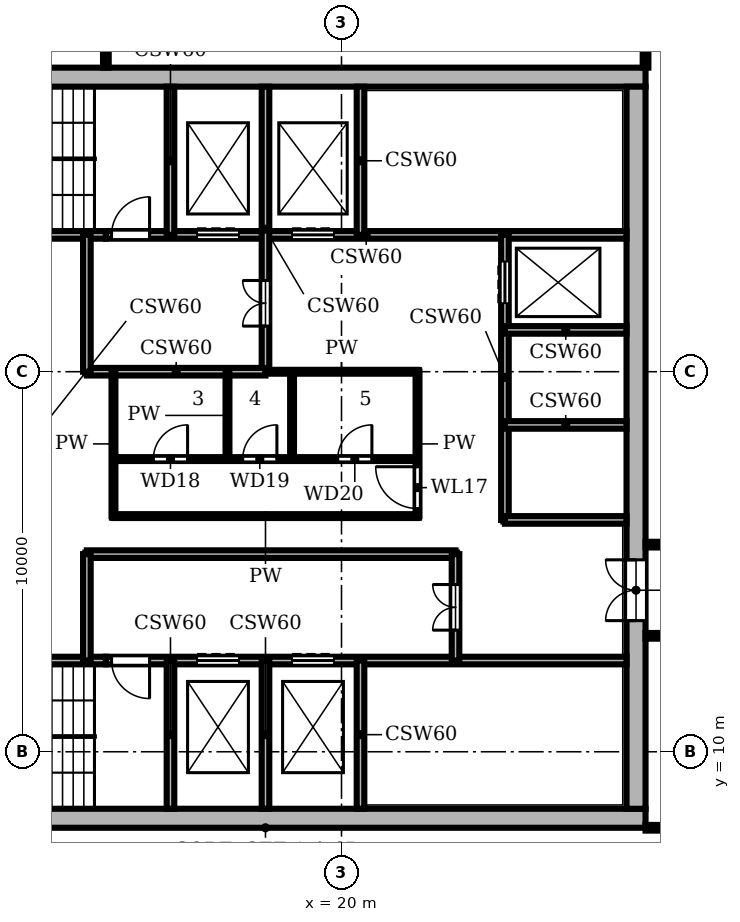
"""IFC4 building model, lengths in metres.
Left out: names, types, materials, properties, quantities, classifications, styles, units other than length and angle.
Written with IfcOpenShell. Run it as: python <this file> out.ifc"""

import sys

from ifc_helpers import new_model, si_unit, direction, frame, frame_2d, origin, place, context, subcontext, project, spatial, rectangle, extrude, element, fill, save


model = new_model("IFC4")
c1 = context("Model", 3, precision=1e-05, world=origin(), true_north=direction((0.0, 1.0)))
c2 = subcontext(c1, "Body", "Model", "MODEL_VIEW")
j1 = project(units=[si_unit("LENGTHUNIT", "METRE"), si_unit("PLANEANGLEUNIT", "RADIAN")], contexts=[c1])
p1 = place(None, origin())
s1 = spatial("IfcSite", under=j1, at=p1, CompositionType="ELEMENT")
p2 = place(p1, origin())
s2 = spatial("IfcBuilding", under=s1, at=p2, CompositionType="ELEMENT")
p3 = place(p2, frame((0.0, 0.0, 282.6)))
s3 = spatial("IfcBuildingStorey", under=s2, at=p3, CompositionType="ELEMENT", Elevation=282.6)
p4 = place(p3, frame((8.0, 8.25, 0.0), z_axis=(0.0, 0.0, 1.0), x_axis=(1.0, 0.0, 0.0)))
e1 = element("IfcWall", 1, at=p4, inside=s3, PredefinedType="SHEAR", context=c2, shape_type="SweptSolid", body=[
    extrude(rectangle(XDim=20.0, YDim=0.5, at=frame_2d((10.0, 0.0))), origin(), (0.0, 0.0, 1.0), 3.9),
])
p5 = place(p3, frame((27.75, 8.5, 0.0), z_axis=(0.0, 0.0, 1.0), x_axis=(0.0, 1.0, 0.0)))
e2 = element("IfcWall", 2, at=p5, inside=s3, PredefinedType="SHEAR", context=c2, shape_type="SweptSolid", body=[
    extrude(rectangle(XDim=19.0, YDim=0.5, at=frame_2d((9.5, 0.0))), origin(), (0.0, 0.0, 1.0), 3.9),
])
p6 = place(p5, frame((4.95, 0.0, 0.0)))
e3 = element("IfcOpeningElement", 3, at=p6, cuts=e2, PredefinedType="OPENING", context=c2, shape_type="SweptSolid", body=[
    extrude(rectangle(XDim=1.6, YDim=2.1, at=frame_2d((0.8, 1.05))), frame((0.0, 0.26, 0.0), z_axis=(0.0, -1.0, 0.0), x_axis=(1.0, 0.0, 0.0)), (0.0, 0.0, 1.0), 0.52),
])
p7 = place(p3, frame((28.0, 27.75, 0.0), z_axis=(0.0, 0.0, 1.0), x_axis=(-1.0, 0.0, 0.0)))
e4 = element("IfcWall", 4, at=p7, inside=s3, PredefinedType="SHEAR", context=c2, shape_type="SweptSolid", body=[
    extrude(rectangle(XDim=20.0, YDim=0.5, at=frame_2d((10.0, 0.0))), origin(), (0.0, 0.0, 1.0), 3.9),
])
p8 = place(p3, frame((8.5, 12.4, 0.0), z_axis=(0.0, 0.0, 1.0), x_axis=(1.0, 0.0, 0.0)))
e5 = element("IfcWall", 5, at=p8, inside=s3, PredefinedType="SHEAR", context=c2, shape_type="SweptSolid", body=[
    extrude(rectangle(XDim=5.3, YDim=0.2, at=frame_2d((2.65, 0.0))), origin(), (0.0, 0.0, 1.0), 3.58),
])
p9 = place(p3, frame((13.8, 12.4, 0.0), z_axis=(0.0, 0.0, 1.0), x_axis=(1.0, 0.0, 0.0)))
e6 = element("IfcWall", 6, at=p9, inside=s3, PredefinedType="SHEAR", context=c2, shape_type="SweptSolid", body=[
    extrude(rectangle(XDim=13.7, YDim=0.2, at=frame_2d((6.85, 0.0))), origin(), (0.0, 0.0, 1.0), 3.58),
])
p10 = place(p9, frame((2.4, 0.0, 0.0)))
e7 = element("IfcOpeningElement", 7, at=p10, cuts=e6, PredefinedType="OPENING", context=c2, shape_type="SweptSolid", body=[
    extrude(rectangle(XDim=1.1, YDim=2.1, at=frame_2d((0.55, 1.05))), frame((0.0, 0.11, 0.0), z_axis=(0.0, -1.0, 0.0), x_axis=(1.0, 0.0, 0.0)), (0.0, 0.0, 1.0), 0.22),
])
p11 = place(p9, frame((4.9, 0.0, 0.0)))
e8 = element("IfcOpeningElement", 8, at=p11, cuts=e6, PredefinedType="OPENING", context=c2, shape_type="SweptSolid", body=[
    extrude(rectangle(XDim=1.1, YDim=2.1, at=frame_2d((0.55, 1.05))), frame((0.0, 0.11, 0.0), z_axis=(0.0, -1.0, 0.0), x_axis=(1.0, 0.0, 0.0)), (0.0, 0.0, 1.0), 0.22),
])
p12 = place(p9, frame((0.15, 0.0, 0.0)))
e9 = element("IfcOpeningElement", 9, at=p12, cuts=e6, PredefinedType="OPENING", context=c2, shape_type="SweptSolid", body=[
    extrude(rectangle(XDim=1.0, YDim=2.1, at=frame_2d((0.5, 1.05))), frame((0.0, 0.11, 0.0), z_axis=(0.0, -1.0, 0.0), x_axis=(1.0, 0.0, 0.0)), (0.0, 0.0, 1.0), 0.22),
])
p13 = place(p3, frame((13.3, 15.2, 0.0), z_axis=(0.0, 0.0, 1.0), x_axis=(1.0, 0.0, 0.0)))
e10 = element("IfcWall", 10, at=p13, inside=s3, PredefinedType="SHEAR", context=c2, shape_type="SweptSolid", body=[
    extrude(rectangle(XDim=9.7, YDim=0.2, at=frame_2d((4.85, 0.0))), origin(), (0.0, 0.0, 1.0), 3.58),
])
p14 = place(p3, frame((24.3, 16.1, 0.0), z_axis=(0.0, 0.0, 1.0), x_axis=(1.0, 0.0, 0.0)))
e11 = element("IfcWall", 11, at=p14, inside=s3, PredefinedType="SHEAR", context=c2, shape_type="SweptSolid", body=[
    extrude(rectangle(XDim=3.2, YDim=0.2, at=frame_2d((1.6, 0.0))), origin(), (0.0, 0.0, 1.0), 3.58),
])
p15 = place(p3, frame((14.0, 16.2, 0.0), z_axis=(0.0, 0.0, 1.0), x_axis=(1.0, 0.0, 0.0)))
e12 = element("IfcWall", 12, at=p15, inside=s3, PredefinedType="PARTITIONING", context=c2, shape_type="SweptSolid", body=[
    extrude(rectangle(XDim=8.0, YDim=0.1, at=frame_2d((4.0, 0.0))), origin(), (0.0, 0.0, 1.0), 3.58),
])
p16 = place(p3, frame((14.0, 17.7, 0.0), z_axis=(0.0, 0.0, 1.0), x_axis=(1.0, 0.0, 0.0)))
e13 = element("IfcWall", 13, at=p16, inside=s3, PredefinedType="PARTITIONING", context=c2, shape_type="SweptSolid", body=[
    extrude(rectangle(XDim=8.0, YDim=0.1, at=frame_2d((4.0, 0.0))), origin(), (0.0, 0.0, 1.0), 3.58),
])
p17 = place(p16, frame((1.05, 0.0, 0.0)))
e14 = element("IfcOpeningElement", 14, at=p17, cuts=e13, PredefinedType="OPENING", context=c2, shape_type="SweptSolid", body=[
    extrude(rectangle(XDim=0.9, YDim=2.1, at=frame_2d((0.45, 1.05))), frame((0.0, 0.06, 0.0), z_axis=(0.0, -1.0, 0.0), x_axis=(1.0, 0.0, 0.0)), (0.0, 0.0, 1.0), 0.12),
])
p18 = place(p16, frame((3.4, 0.0, 0.0)))
e15 = element("IfcOpeningElement", 15, at=p18, cuts=e13, PredefinedType="OPENING", context=c2, shape_type="SweptSolid", body=[
    extrude(rectangle(XDim=0.9, YDim=2.1, at=frame_2d((0.45, 1.05))), frame((0.0, 0.06, 0.0), z_axis=(0.0, -1.0, 0.0), x_axis=(1.0, 0.0, 0.0)), (0.0, 0.0, 1.0), 0.12),
])
p19 = place(p16, frame((5.9, 0.0, 0.0)))
e16 = element("IfcOpeningElement", 16, at=p19, cuts=e13, PredefinedType="OPENING", context=c2, shape_type="SweptSolid", body=[
    extrude(rectangle(XDim=0.9, YDim=2.1, at=frame_2d((0.45, 1.05))), frame((0.0, 0.06, 0.0), z_axis=(0.0, -1.0, 0.0), x_axis=(1.0, 0.0, 0.0)), (0.0, 0.0, 1.0), 0.12),
])
p20 = place(p3, frame((24.3, 18.6, 0.0), z_axis=(0.0, 0.0, 1.0), x_axis=(1.0, 0.0, 0.0)))
e17 = element("IfcWall", 17, at=p20, inside=s3, PredefinedType="SHEAR", context=c2, shape_type="SweptSolid", body=[
    extrude(rectangle(XDim=3.2, YDim=0.2, at=frame_2d((1.6, 0.0))), origin(), (0.0, 0.0, 1.0), 3.58),
])
p21 = place(p3, frame((18.0, 20.0, 0.0), z_axis=(0.0, 0.0, 1.0), x_axis=(1.0, 0.0, 0.0)))
e18 = element("IfcWall", 18, at=p21, inside=s3, PredefinedType="PARTITIONING", context=c2, shape_type="SweptSolid", body=[
    extrude(rectangle(XDim=4.0, YDim=0.1, at=frame_2d((2.0, 0.0))), origin(), (0.0, 0.0, 1.0), 3.58),
])
p22 = place(p3, frame((13.3, 20.0, 0.0), z_axis=(0.0, 0.0, 1.0), x_axis=(1.0, 0.0, 0.0)))
e19 = element("IfcWall", 19, at=p22, inside=s3, PredefinedType="SHEAR", context=c2, shape_type="SweptSolid", body=[
    extrude(rectangle(XDim=4.7, YDim=0.2, at=frame_2d((2.35, 0.0))), origin(), (0.0, 0.0, 1.0), 3.58),
])
p23 = place(p3, frame((24.3, 21.1, 0.0), z_axis=(0.0, 0.0, 1.0), x_axis=(1.0, 0.0, 0.0)))
e20 = element("IfcWall", 20, at=p23, inside=s3, PredefinedType="SHEAR", context=c2, shape_type="SweptSolid", body=[
    extrude(rectangle(XDim=3.2, YDim=0.2, at=frame_2d((1.6, 0.0))), origin(), (0.0, 0.0, 1.0), 3.58),
])
p24 = place(p3, frame((8.5, 23.6, 0.0), z_axis=(0.0, 0.0, 1.0), x_axis=(1.0, 0.0, 0.0)))
e21 = element("IfcWall", 21, at=p24, inside=s3, PredefinedType="SHEAR", context=c2, shape_type="SweptSolid", body=[
    extrude(rectangle(XDim=5.3, YDim=0.2, at=frame_2d((2.65, 0.0))), origin(), (0.0, 0.0, 1.0), 3.58),
])
p25 = place(p3, frame((13.8, 23.6, 0.0), z_axis=(0.0, 0.0, 1.0), x_axis=(1.0, 0.0, 0.0)))
e22 = element("IfcWall", 22, at=p25, inside=s3, PredefinedType="SHEAR", context=c2, shape_type="SweptSolid", body=[
    extrude(rectangle(XDim=13.7, YDim=0.2, at=frame_2d((6.85, 0.0))), origin(), (0.0, 0.0, 1.0), 3.58),
])
p26 = place(p25, frame((2.4, 0.0, 0.0)))
e23 = element("IfcOpeningElement", 23, at=p26, cuts=e22, PredefinedType="OPENING", context=c2, shape_type="SweptSolid", body=[
    extrude(rectangle(XDim=1.1, YDim=2.1, at=frame_2d((0.55, 1.05))), frame((0.0, 0.11, 0.0), z_axis=(0.0, -1.0, 0.0), x_axis=(1.0, 0.0, 0.0)), (0.0, 0.0, 1.0), 0.22),
])
p27 = place(p25, frame((4.9, 0.0, 0.0)))
e24 = element("IfcOpeningElement", 24, at=p27, cuts=e22, PredefinedType="OPENING", context=c2, shape_type="SweptSolid", body=[
    extrude(rectangle(XDim=1.1, YDim=2.1, at=frame_2d((0.55, 1.05))), frame((0.0, 0.11, 0.0), z_axis=(0.0, -1.0, 0.0), x_axis=(1.0, 0.0, 0.0)), (0.0, 0.0, 1.0), 0.22),
])
p28 = place(p25, frame((0.15, 0.0, 0.0)))
e25 = element("IfcOpeningElement", 25, at=p28, cuts=e22, PredefinedType="OPENING", context=c2, shape_type="SweptSolid", body=[
    extrude(rectangle(XDim=1.0, YDim=2.1, at=frame_2d((0.5, 1.05))), frame((0.0, 0.11, 0.0), z_axis=(0.0, -1.0, 0.0), x_axis=(1.0, 0.0, 0.0)), (0.0, 0.0, 1.0), 0.22),
])
p29 = place(p3, frame((13.3, 12.4, 0.0), z_axis=(0.0, 0.0, 1.0), x_axis=(0.0, 1.0, 0.0)))
e26 = element("IfcWall", 26, at=p29, inside=s3, PredefinedType="SHEAR", context=c2, shape_type="SweptSolid", body=[
    extrude(rectangle(XDim=2.8, YDim=0.2, at=frame_2d((1.4, 0.0))), origin(), (0.0, 0.0, 1.0), 3.58),
])
p30 = place(p3, frame((13.3, 20.0, 0.0), z_axis=(0.0, 0.0, 1.0), x_axis=(0.0, 1.0, 0.0)))
e27 = element("IfcWall", 27, at=p30, inside=s3, PredefinedType="SHEAR", context=c2, shape_type="SweptSolid", body=[
    extrude(rectangle(XDim=3.6, YDim=0.2, at=frame_2d((1.8, 0.0))), origin(), (0.0, 0.0, 1.0), 3.58),
])
p31 = place(p3, frame((14.0, 16.2, 0.0), z_axis=(0.0, 0.0, 1.0), x_axis=(0.0, 1.0, 0.0)))
e28 = element("IfcWall", 28, at=p31, inside=s3, PredefinedType="PARTITIONING", context=c2, shape_type="SweptSolid", body=[
    extrude(rectangle(XDim=3.8, YDim=0.1, at=frame_2d((1.9, 0.0))), origin(), (0.0, 0.0, 1.0), 3.58),
])
for number, where, z_axis, x_axis in (
    (29, (15.5, 8.5, 0.0), (0.0, 0.0, 1.0), (0.0, 1.0, 0.0)),
    (30, (15.5, 23.6, 0.0), (0.0, 0.0, 1.0), (0.0, 1.0, 0.0)),
):
    element("IfcWall", number, at=place(p3, frame(where, z_axis=z_axis, x_axis=x_axis)), inside=s3, PredefinedType="SHEAR", context=c2, shape_type="SweptSolid", body=[
        extrude(rectangle(XDim=3.9, YDim=0.2, at=frame_2d((1.95, 0.0))), origin(), (0.0, 0.0, 1.0), 3.58),
    ])
p32 = place(p3, frame((17.0, 17.7, 0.0), z_axis=(0.0, 0.0, 1.0), x_axis=(0.0, 1.0, 0.0)))
e31 = element("IfcWall", 31, at=p32, inside=s3, PredefinedType="PARTITIONING", context=c2, shape_type="SweptSolid", body=[
    extrude(rectangle(XDim=2.3, YDim=0.1, at=frame_2d((1.15, 0.0))), origin(), (0.0, 0.0, 1.0), 3.58),
])
p33 = place(p3, frame((18.0, 8.5, 0.0), z_axis=(0.0, 0.0, 1.0), x_axis=(0.0, 1.0, 0.0)))
e32 = element("IfcWall", 32, at=p33, inside=s3, PredefinedType="SHEAR", context=c2, shape_type="SweptSolid", body=[
    extrude(rectangle(XDim=3.9, YDim=0.2, at=frame_2d((1.95, 0.0))), origin(), (0.0, 0.0, 1.0), 3.58),
])
p34 = place(p3, frame((18.0, 20.0, 0.0), z_axis=(0.0, 0.0, 1.0), x_axis=(0.0, 1.0, 0.0)))
e33 = element("IfcWall", 33, at=p34, inside=s3, PredefinedType="SHEAR", context=c2, shape_type="SweptSolid", body=[
    extrude(rectangle(XDim=7.5, YDim=0.2, at=frame_2d((3.75, 0.0))), origin(), (0.0, 0.0, 1.0), 3.58),
])
p35 = place(p34, frame((1.2, 0.0, 0.0)))
e34 = element("IfcOpeningElement", 34, at=p35, cuts=e33, PredefinedType="OPENING", context=c2, shape_type="SweptSolid", body=[
    extrude(rectangle(XDim=1.2, YDim=2.1, at=frame_2d((0.6, 1.05))), frame((0.0, 0.11, 0.0), z_axis=(0.0, -1.0, 0.0), x_axis=(1.0, 0.0, 0.0)), (0.0, 0.0, 1.0), 0.22),
])
p36 = place(p3, frame((18.7, 17.7, 0.0), z_axis=(0.0, 0.0, 1.0), x_axis=(0.0, 1.0, 0.0)))
e35 = element("IfcWall", 35, at=p36, inside=s3, PredefinedType="PARTITIONING", context=c2, shape_type="SweptSolid", body=[
    extrude(rectangle(XDim=2.3, YDim=0.1, at=frame_2d((1.15, 0.0))), origin(), (0.0, 0.0, 1.0), 3.58),
])
for number, where, z_axis, x_axis in (
    (36, (20.5, 8.5, 0.0), (0.0, 0.0, 1.0), (0.0, 1.0, 0.0)),
    (37, (20.5, 23.6, 0.0), (0.0, 0.0, 1.0), (0.0, 1.0, 0.0)),
):
    element("IfcWall", number, at=place(p3, frame(where, z_axis=z_axis, x_axis=x_axis)), inside=s3, PredefinedType="SHEAR", context=c2, shape_type="SweptSolid", body=[
        extrude(rectangle(XDim=3.9, YDim=0.2, at=frame_2d((1.95, 0.0))), origin(), (0.0, 0.0, 1.0), 3.58),
    ])
p37 = place(p3, frame((22.0, 16.2, 0.0), z_axis=(0.0, 0.0, 1.0), x_axis=(0.0, 1.0, 0.0)))
e38 = element("IfcWall", 38, at=p37, inside=s3, PredefinedType="PARTITIONING", context=c2, shape_type="SweptSolid", body=[
    extrude(rectangle(XDim=3.8, YDim=0.1, at=frame_2d((1.9, 0.0))), origin(), (0.0, 0.0, 1.0), 3.58),
])
p38 = place(p37, frame((0.2, 0.0, 0.0)))
e39 = element("IfcOpeningElement", 39, at=p38, cuts=e38, PredefinedType="OPENING", context=c2, shape_type="SweptSolid", body=[
    extrude(rectangle(XDim=1.1, YDim=2.1, at=frame_2d((0.55, 1.05))), frame((0.0, 0.06, 0.0), z_axis=(0.0, -1.0, 0.0), x_axis=(1.0, 0.0, 0.0)), (0.0, 0.0, 1.0), 0.12),
])
p39 = place(p3, frame((23.0, 12.4, 0.0), z_axis=(0.0, 0.0, 1.0), x_axis=(0.0, 1.0, 0.0)))
e40 = element("IfcWall", 40, at=p39, inside=s3, PredefinedType="SHEAR", context=c2, shape_type="SweptSolid", body=[
    extrude(rectangle(XDim=2.8, YDim=0.2, at=frame_2d((1.4, 0.0))), origin(), (0.0, 0.0, 1.0), 3.58),
])
p40 = place(p39, frame((0.8, 0.0, 0.0)))
e41 = element("IfcOpeningElement", 41, at=p40, cuts=e40, PredefinedType="OPENING", context=c2, shape_type="SweptSolid", body=[
    extrude(rectangle(XDim=1.2, YDim=2.1, at=frame_2d((0.6, 1.05))), frame((0.0, 0.11, 0.0), z_axis=(0.0, -1.0, 0.0), x_axis=(1.0, 0.0, 0.0)), (0.0, 0.0, 1.0), 0.22),
])
p41 = place(p3, frame((24.3, 16.1, 0.0), z_axis=(0.0, 0.0, 1.0), x_axis=(0.0, 1.0, 0.0)))
e42 = element("IfcWall", 42, at=p41, inside=s3, PredefinedType="SHEAR", context=c2, shape_type="SweptSolid", body=[
    extrude(rectangle(XDim=7.5, YDim=0.2, at=frame_2d((3.75, 0.0))), origin(), (0.0, 0.0, 1.0), 3.58),
])
p42 = place(p41, frame((5.7, 0.0, 0.0)))
e43 = element("IfcOpeningElement", 43, at=p42, cuts=e42, PredefinedType="OPENING", context=c2, shape_type="SweptSolid", body=[
    extrude(rectangle(XDim=1.1, YDim=2.1, at=frame_2d((0.55, 1.05))), frame((0.0, 0.11, 0.0), z_axis=(0.0, -1.0, 0.0), x_axis=(1.0, 0.0, 0.0)), (0.0, 0.0, 1.0), 0.22),
])
p43 = place(p3, frame((13.8, 28.0, 0.0), z_axis=(0.0, 0.0, 1.0), x_axis=(0.0, 1.0, 0.0)))
e44 = element("IfcWall", 44, at=p43, inside=s3, PredefinedType="PARTITIONING", context=c2, shape_type="SweptSolid", body=[
    extrude(rectangle(XDim=2.801, YDim=0.15, at=frame_2d((1.4, 0.0))), origin(), (0.0, 0.0, 1.0), 3.58),
])
p44 = place(p3, frame((28.0, 28.0, 0.0), z_axis=(0.0, 0.0, 1.0), x_axis=(0.0, 1.0, 0.0)))
e45 = element("IfcWall", 45, at=p44, inside=s3, PredefinedType="PARTITIONING", context=c2, shape_type="SweptSolid", body=[
    extrude(rectangle(XDim=2.598, YDim=0.15, at=frame_2d((1.299, 0.0))), origin(), (0.0, 0.0, 1.0), 3.58),
])
for number, where, z_axis, x_axis in (
    (46, (28.0, 8.0, 0.0), (0.0, 0.0, 1.0), (1.0, 0.0, 0.0)),
    (47, (28.0, 13.05, 0.0), (0.0, 0.0, 1.0), (1.0, 0.0, 0.0)),
    (48, (28.0, 15.45, 0.0), (0.0, 0.0, 1.0), (1.0, 0.0, 0.0)),
):
    element("IfcWall", number, at=place(p3, frame(where, z_axis=z_axis, x_axis=x_axis)), inside=s3, PredefinedType="PARTITIONING", context=c2, shape_type="SweptSolid", body=[
        extrude(rectangle(XDim=2.8, YDim=0.15, at=frame_2d((1.4, 0.0))), origin(), (0.0, 0.0, 1.0), 3.58),
    ])
p45 = place(p42, origin())
e49 = element("IfcDoor", 49, at=p45, inside=s3, OperationType="DOUBLE_DOOR_SLIDING", PredefinedType="DOOR", context=c2, shape_type="SweptSolid", body=[
    extrude(rectangle(XDim=1.1, YDim=2.1, at=frame_2d((0.55, 1.05))), frame((0.0, 0.025, 0.0), z_axis=(0.0, -1.0, 0.0), x_axis=(1.0, 0.0, 0.0)), (0.0, 0.0, 1.0), 0.05),
])
fill(e43, e49)
p46 = place(p10, origin())
e50 = element("IfcDoor", 50, at=p46, inside=s3, OperationType="DOUBLE_DOOR_SLIDING", PredefinedType="DOOR", context=c2, shape_type="SweptSolid", body=[
    extrude(rectangle(XDim=1.1, YDim=2.1, at=frame_2d((0.55, 1.05))), frame((0.0, 0.025, 0.0), z_axis=(0.0, -1.0, 0.0), x_axis=(1.0, 0.0, 0.0)), (0.0, 0.0, 1.0), 0.05),
])
fill(e7, e50)
p47 = place(p11, origin())
e51 = element("IfcDoor", 51, at=p47, inside=s3, OperationType="DOUBLE_DOOR_SLIDING", PredefinedType="DOOR", context=c2, shape_type="SweptSolid", body=[
    extrude(rectangle(XDim=1.1, YDim=2.1, at=frame_2d((0.55, 1.05))), frame((0.0, 0.025, 0.0), z_axis=(0.0, -1.0, 0.0), x_axis=(1.0, 0.0, 0.0)), (0.0, 0.0, 1.0), 0.05),
])
fill(e8, e51)
p48 = place(p26, origin())
e52 = element("IfcDoor", 52, at=p48, inside=s3, OperationType="DOUBLE_DOOR_SLIDING", PredefinedType="DOOR", context=c2, shape_type="SweptSolid", body=[
    extrude(rectangle(XDim=1.1, YDim=2.1, at=frame_2d((0.55, 1.05))), frame((0.0, 0.025, 0.0), z_axis=(0.0, -1.0, 0.0), x_axis=(1.0, 0.0, 0.0)), (0.0, 0.0, 1.0), 0.05),
])
fill(e23, e52)
p49 = place(p27, origin())
e53 = element("IfcDoor", 53, at=p49, inside=s3, OperationType="DOUBLE_DOOR_SLIDING", PredefinedType="DOOR", context=c2, shape_type="SweptSolid", body=[
    extrude(rectangle(XDim=1.1, YDim=2.1, at=frame_2d((0.55, 1.05))), frame((0.0, 0.025, 0.0), z_axis=(0.0, -1.0, 0.0), x_axis=(1.0, 0.0, 0.0)), (0.0, 0.0, 1.0), 0.05),
])
fill(e24, e53)
p50 = place(p12, frame((1.0, 0.0, 0.0), z_axis=(0.0, 0.0, 1.0), x_axis=(-1.0, 0.0, 0.0)))
e54 = element("IfcDoor", 54, at=p50, inside=s3, OperationType="SINGLE_SWING_LEFT", PredefinedType="DOOR", context=c2, shape_type="SweptSolid", body=[
    extrude(rectangle(XDim=1.0, YDim=2.1, at=frame_2d((0.5, 1.05))), frame((0.0, 0.025, 0.0), z_axis=(0.0, -1.0, 0.0), x_axis=(1.0, 0.0, 0.0)), (0.0, 0.0, 1.0), 0.05),
])
fill(e9, e54)
p51 = place(p28, origin())
e55 = element("IfcDoor", 55, at=p51, inside=s3, OperationType="SINGLE_SWING_RIGHT", PredefinedType="DOOR", context=c2, shape_type="SweptSolid", body=[
    extrude(rectangle(XDim=1.0, YDim=2.1, at=frame_2d((0.5, 1.05))), frame((0.0, 0.025, 0.0), z_axis=(0.0, -1.0, 0.0), x_axis=(1.0, 0.0, 0.0)), (0.0, 0.0, 1.0), 0.05),
])
fill(e25, e55)
p52 = place(p40, origin())
e56 = element("IfcDoor", 56, at=p52, inside=s3, OperationType="DOUBLE_DOOR_SINGLE_SWING", PredefinedType="DOOR", context=c2, shape_type="SweptSolid", body=[
    extrude(rectangle(XDim=1.2, YDim=2.1, at=frame_2d((0.6, 1.05))), frame((0.0, 0.025, 0.0), z_axis=(0.0, -1.0, 0.0), x_axis=(1.0, 0.0, 0.0)), (0.0, 0.0, 1.0), 0.05),
])
fill(e41, e56)
p53 = place(p35, origin())
e57 = element("IfcDoor", 57, at=p53, inside=s3, OperationType="DOUBLE_DOOR_SINGLE_SWING", PredefinedType="DOOR", context=c2, shape_type="SweptSolid", body=[
    extrude(rectangle(XDim=1.2, YDim=2.1, at=frame_2d((0.6, 1.05))), frame((0.0, 0.025, 0.0), z_axis=(0.0, -1.0, 0.0), x_axis=(1.0, 0.0, 0.0)), (0.0, 0.0, 1.0), 0.05),
])
fill(e34, e57)
p54 = place(p38, origin())
e58 = element("IfcDoor", 58, at=p54, inside=s3, OperationType="SINGLE_SWING_RIGHT", PredefinedType="DOOR", context=c2, shape_type="SweptSolid", body=[
    extrude(rectangle(XDim=1.1, YDim=2.1, at=frame_2d((0.55, 1.05))), frame((0.0, 0.025, 0.0), z_axis=(0.0, -1.0, 0.0), x_axis=(1.0, 0.0, 0.0)), (0.0, 0.0, 1.0), 0.05),
])
fill(e39, e58)
p55 = place(p17, origin())
e59 = element("IfcDoor", 59, at=p55, inside=s3, OperationType="SINGLE_SWING_RIGHT", PredefinedType="DOOR", context=c2, shape_type="SweptSolid", body=[
    extrude(rectangle(XDim=0.9, YDim=2.1, at=frame_2d((0.45, 1.05))), frame((0.0, 0.025, 0.0), z_axis=(0.0, -1.0, 0.0), x_axis=(1.0, 0.0, 0.0)), (0.0, 0.0, 1.0), 0.05),
])
fill(e14, e59)
p56 = place(p18, origin())
e60 = element("IfcDoor", 60, at=p56, inside=s3, OperationType="SINGLE_SWING_RIGHT", PredefinedType="DOOR", context=c2, shape_type="SweptSolid", body=[
    extrude(rectangle(XDim=0.9, YDim=2.1, at=frame_2d((0.45, 1.05))), frame((0.0, 0.025, 0.0), z_axis=(0.0, -1.0, 0.0), x_axis=(1.0, 0.0, 0.0)), (0.0, 0.0, 1.0), 0.05),
])
fill(e15, e60)
p57 = place(p19, origin())
e61 = element("IfcDoor", 61, at=p57, inside=s3, OperationType="SINGLE_SWING_RIGHT", PredefinedType="DOOR", context=c2, shape_type="SweptSolid", body=[
    extrude(rectangle(XDim=0.9, YDim=2.1, at=frame_2d((0.45, 1.05))), frame((0.0, 0.025, 0.0), z_axis=(0.0, -1.0, 0.0), x_axis=(1.0, 0.0, 0.0)), (0.0, 0.0, 1.0), 0.05),
])
fill(e16, e61)
p58 = place(p6, origin())
e62 = element("IfcDoor", 62, at=p58, inside=s3, OperationType="DOUBLE_DOOR_SINGLE_SWING", PredefinedType="DOOR", context=c2, shape_type="SweptSolid", body=[
    extrude(rectangle(XDim=1.6, YDim=2.1, at=frame_2d((0.8, 1.05))), frame((0.0, 0.025, 0.0), z_axis=(0.0, -1.0, 0.0), x_axis=(1.0, 0.0, 0.0)), (0.0, 0.0, 1.0), 0.05),
])
fill(e3, e62)
save(model, sys.argv[1])
